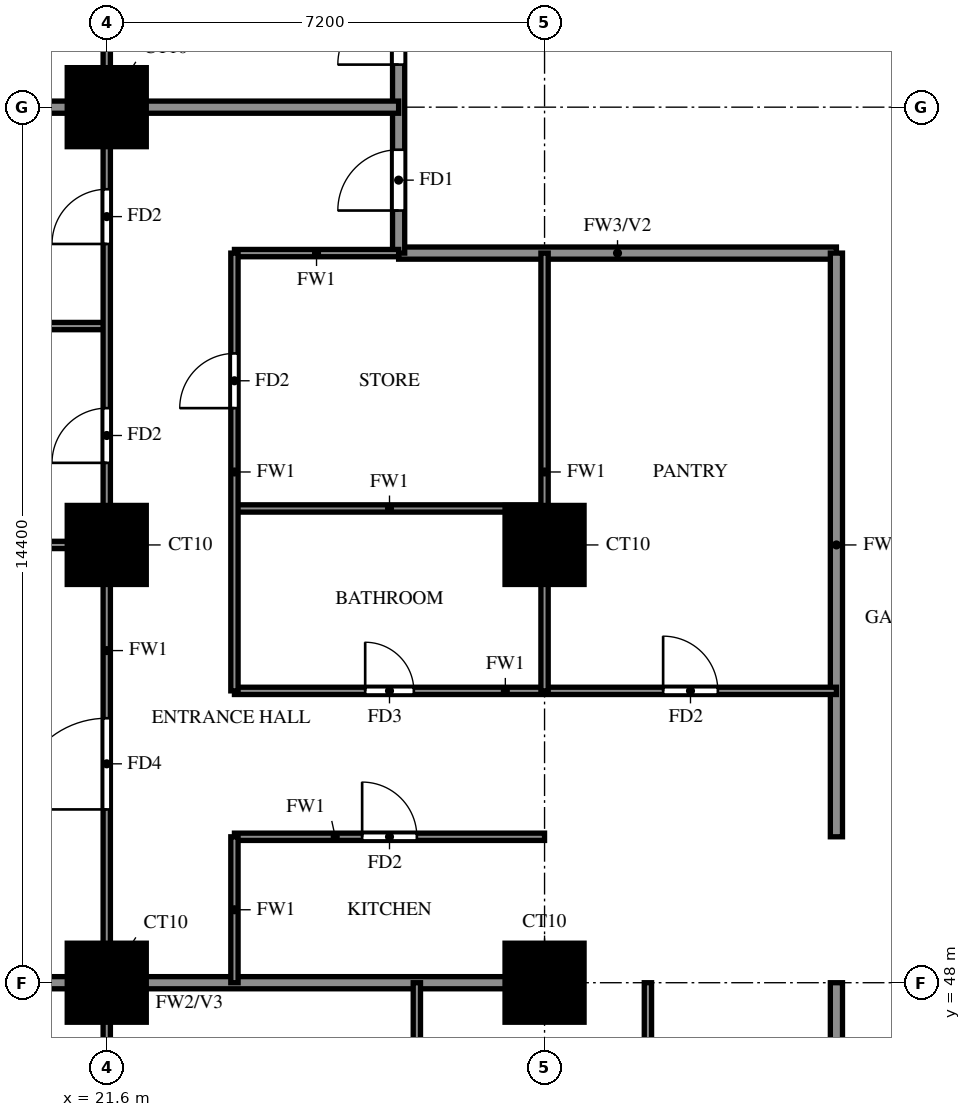
"""IFC4 building model, lengths in metres.
Left out: names, types, materials, properties, quantities, classifications, styles, units other than length and angle.
Written with IfcOpenShell. Run it as: python <this file> out.ifc"""

import sys

from ifc_helpers import new_model, si_unit, direction, frame, frame_2d, origin, origin_2d, place, context, subcontext, project, spatial, rectangle, extrude, source, transform, mapped, element, fill, save


model = new_model("IFC4")
c1 = context("Model", 3, precision=1e-05, world=origin(), true_north=direction((0.0, 1.0)))
c2 = subcontext(c1, "Body", "Model", "MODEL_VIEW")
j1 = project(units=[si_unit("LENGTHUNIT", "METRE"), si_unit("PLANEANGLEUNIT", "RADIAN")], contexts=[c1])
p1 = place(None, origin())
s1 = spatial("IfcSite", under=j1, at=p1, CompositionType="ELEMENT")
p2 = place(p1, origin())
s2 = spatial("IfcBuilding", under=s1, at=p2, CompositionType="ELEMENT")
p3 = place(p2, frame((0.0, 0.0, 79.5)))
s3 = spatial("IfcBuildingStorey", under=s2, at=p3, CompositionType="ELEMENT", Elevation=79.5)
m1 = source(origin(), c2, "Body", "SweptSolid", [
    extrude(rectangle(XDim=1.3, YDim=1.3, at=origin_2d()), origin(), (0.0, 0.0, 1.0), 3.18),
])
for number, where, z_axis, x_axis in (
    (1, (21.6, 48.0, 0.0), (0.0, 0.0, 1.0), (1.0, 0.0, 0.0)),
    (2, (28.8, 48.0, 0.0), (0.0, 0.0, 1.0), (1.0, 0.0, 0.0)),
    (3, (21.6, 55.2, 0.0), (0.0, 0.0, 1.0), (1.0, 0.0, 0.0)),
    (4, (28.8, 55.2, 0.0), (0.0, 0.0, 1.0), (1.0, 0.0, 0.0)),
    (5, (21.6, 62.4, 0.0), (0.0, 0.0, 1.0), (1.0, 0.0, 0.0)),
):
    element("IfcColumn", number, at=place(p3, frame(where, z_axis=z_axis, x_axis=x_axis)), inside=s3, PredefinedType="COLUMN", context=c2, shape_type="MappedRepresentation", body=[
        mapped(m1, transform((0.0, 0.0, 0.0))),
    ])
p4 = place(p3, frame((26.4, 60.0, 0.0), z_axis=(0.0, 0.0, 1.0), x_axis=(1.0, 0.0, 0.0)))
e6 = element("IfcWall", 6, at=p4, inside=s3, PredefinedType="SOLIDWALL", context=c2, shape_type="SweptSolid", body=[
    extrude(rectangle(XDim=7.2, YDim=0.2, at=frame_2d((3.6, 0.0))), origin(), (0.0, 0.0, 1.0), 3.18),
])
p5 = place(p3, frame((26.4, 60.0, 0.0), z_axis=(0.0, 0.0, 1.0), x_axis=(0.0, 1.0, 0.0)))
e7 = element("IfcWall", 7, at=p5, inside=s3, PredefinedType="SOLIDWALL", context=c2, shape_type="SweptSolid", body=[
    extrude(rectangle(XDim=9.45, YDim=0.2, at=frame_2d((4.725, 0.0))), origin(), (0.0, 0.0, 1.0), 3.18),
])
p6 = place(p5, frame((0.7, 0.0, 0.0)))
e8 = element("IfcOpeningElement", 8, at=p6, cuts=e7, PredefinedType="OPENING", context=c2, shape_type="SweptSolid", body=[
    extrude(rectangle(XDim=1.0, YDim=2.1, at=frame_2d((0.5, 1.05))), frame((0.0, 0.11, 0.0), z_axis=(0.0, -1.0, 0.0), x_axis=(1.0, 0.0, 0.0)), (0.0, 0.0, 1.0), 0.22),
])
p7 = place(p5, frame((3.1, 0.0, 0.0)))
e9 = element("IfcOpeningElement", 9, at=p7, cuts=e7, PredefinedType="OPENING", context=c2, shape_type="SweptSolid", body=[
    extrude(rectangle(XDim=1.0, YDim=2.1, at=frame_2d((0.5, 1.05))), frame((0.0, 0.11, 0.0), z_axis=(0.0, -1.0, 0.0), x_axis=(1.0, 0.0, 0.0)), (0.0, 0.0, 1.0), 0.22),
])
p8 = place(p3, frame((33.6, 45.6, 0.0), z_axis=(0.0, 0.0, 1.0), x_axis=(0.0, 1.0, 0.0)))
e10 = element("IfcWall", 10, at=p8, inside=s3, PredefinedType="SOLIDWALL", context=c2, shape_type="SweptSolid", body=[
    extrude(rectangle(XDim=2.4, YDim=0.2, at=frame_2d((1.2, 0.0))), origin(), (0.0, 0.0, 1.0), 3.18),
])
p9 = place(p3, frame((33.6, 50.4, 0.0), z_axis=(0.0, 0.0, 1.0), x_axis=(0.0, 1.0, 0.0)))
e11 = element("IfcWall", 11, at=p9, inside=s3, PredefinedType="SOLIDWALL", context=c2, shape_type="SweptSolid", body=[
    extrude(rectangle(XDim=9.6, YDim=0.2, at=frame_2d((4.8, 0.0))), origin(), (0.0, 0.0, 1.0), 3.18),
])
p10 = place(p3, frame((14.525, 48.0, 0.0), z_axis=(0.0, 0.0, 1.0), x_axis=(1.0, 0.0, 0.0)))
e12 = element("IfcWall", 12, at=p10, inside=s3, PredefinedType="SOLIDWALL", context=c2, shape_type="SweptSolid", body=[
    extrude(rectangle(XDim=14.275, YDim=0.2, at=frame_2d((7.138, 0.0))), origin(), (0.0, 0.0, 1.0), 3.18),
])
p11 = place(p3, frame((14.525, 62.4, 0.0), z_axis=(0.0, 0.0, 1.0), x_axis=(1.0, 0.0, 0.0)))
e13 = element("IfcWall", 13, at=p11, inside=s3, PredefinedType="SOLIDWALL", context=c2, shape_type="SweptSolid", body=[
    extrude(rectangle(XDim=11.875, YDim=0.2, at=frame_2d((5.938, 0.0))), origin(), (0.0, 0.0, 1.0), 3.18),
])
p12 = place(p3, frame((23.7, 50.4, 0.0), z_axis=(0.0, 0.0, 1.0), x_axis=(1.0, 0.0, 0.0)))
e14 = element("IfcWall", 14, at=p12, inside=s3, PredefinedType="PARTITIONING", context=c2, shape_type="SweptSolid", body=[
    extrude(rectangle(XDim=5.1, YDim=0.12, at=frame_2d((2.55, 0.0))), origin(), (0.0, 0.0, 1.0), 3.18),
])
p13 = place(p12, frame((2.1, 0.0, 0.0)))
e15 = element("IfcOpeningElement", 15, at=p13, cuts=e14, PredefinedType="OPENING", context=c2, shape_type="SweptSolid", body=[
    extrude(rectangle(XDim=0.9, YDim=2.1, at=frame_2d((0.45, 1.05))), frame((0.0, 0.07, 0.0), z_axis=(0.0, -1.0, 0.0), x_axis=(1.0, 0.0, 0.0)), (0.0, 0.0, 1.0), 0.14),
])
p14 = place(p3, frame((23.7, 52.8, 0.0), z_axis=(0.0, 0.0, 1.0), x_axis=(1.0, 0.0, 0.0)))
e16 = element("IfcWall", 16, at=p14, inside=s3, PredefinedType="PARTITIONING", context=c2, shape_type="SweptSolid", body=[
    extrude(rectangle(XDim=9.9, YDim=0.12, at=frame_2d((4.95, 0.0))), origin(), (0.0, 0.0, 1.0), 3.18),
])
p15 = place(p14, frame((2.15, 0.0, 0.0)))
e17 = element("IfcOpeningElement", 17, at=p15, cuts=e16, PredefinedType="OPENING", context=c2, shape_type="SweptSolid", body=[
    extrude(rectangle(XDim=0.8, YDim=2.1, at=frame_2d((0.4, 1.05))), frame((0.0, 0.07, 0.0), z_axis=(0.0, -1.0, 0.0), x_axis=(1.0, 0.0, 0.0)), (0.0, 0.0, 1.0), 0.14),
])
p16 = place(p14, frame((7.05, 0.0, 0.0)))
e18 = element("IfcOpeningElement", 18, at=p16, cuts=e16, PredefinedType="OPENING", context=c2, shape_type="SweptSolid", body=[
    extrude(rectangle(XDim=0.9, YDim=2.1, at=frame_2d((0.45, 1.05))), frame((0.0, 0.07, 0.0), z_axis=(0.0, -1.0, 0.0), x_axis=(1.0, 0.0, 0.0)), (0.0, 0.0, 1.0), 0.14),
])
p17 = place(p3, frame((14.525, 55.2, 0.0), z_axis=(0.0, 0.0, 1.0), x_axis=(1.0, 0.0, 0.0)))
e19 = element("IfcWall", 19, at=p17, inside=s3, PredefinedType="PARTITIONING", context=c2, shape_type="SweptSolid", body=[
    extrude(rectangle(XDim=7.075, YDim=0.12, at=frame_2d((3.538, 0.0))), origin(), (0.0, 0.0, 1.0), 3.18),
])
p18 = place(p3, frame((23.7, 55.8, 0.0), z_axis=(0.0, 0.0, 1.0), x_axis=(1.0, 0.0, 0.0)))
e20 = element("IfcWall", 20, at=p18, inside=s3, PredefinedType="PARTITIONING", context=c2, shape_type="SweptSolid", body=[
    extrude(rectangle(XDim=5.1, YDim=0.12, at=frame_2d((2.55, 0.0))), origin(), (0.0, 0.0, 1.0), 3.18),
])
p19 = place(p3, frame((14.525, 58.8, 0.0), z_axis=(0.0, 0.0, 1.0), x_axis=(1.0, 0.0, 0.0)))
e21 = element("IfcWall", 21, at=p19, inside=s3, PredefinedType="PARTITIONING", context=c2, shape_type="SweptSolid", body=[
    extrude(rectangle(XDim=7.075, YDim=0.12, at=frame_2d((3.538, 0.0))), origin(), (0.0, 0.0, 1.0), 2.28),
])
p20 = place(p3, frame((23.7, 60.0, 0.0), z_axis=(0.0, 0.0, 1.0), x_axis=(1.0, 0.0, 0.0)))
e22 = element("IfcWall", 22, at=p20, inside=s3, PredefinedType="PARTITIONING", context=c2, shape_type="SweptSolid", body=[
    extrude(rectangle(XDim=2.7, YDim=0.12, at=frame_2d((1.35, 0.0))), origin(), (0.0, 0.0, 1.0), 3.18),
])
p21 = place(p3, frame((21.6, 33.725, 0.0), z_axis=(0.0, 0.0, 1.0), x_axis=(0.0, 1.0, 0.0)))
e23 = element("IfcWall", 23, at=p21, inside=s3, PredefinedType="PARTITIONING", context=c2, shape_type="SweptSolid", body=[
    extrude(rectangle(XDim=39.475, YDim=0.12, at=frame_2d((19.737, 0.0))), origin(), (0.0, 0.0, 1.0), 3.18),
])
p22 = place(p21, frame((7.775, 0.0, 0.0)))
e24 = element("IfcOpeningElement", 24, at=p22, cuts=e23, PredefinedType="OPENING", context=c2, shape_type="SweptSolid", body=[
    extrude(rectangle(XDim=0.9, YDim=2.1, at=frame_2d((0.45, 1.05))), frame((0.0, 0.07, 0.0), z_axis=(0.0, -1.0, 0.0), x_axis=(1.0, 0.0, 0.0)), (0.0, 0.0, 1.0), 0.14),
])
p23 = place(p21, frame((17.125, 0.0, 0.0)))
e25 = element("IfcOpeningElement", 25, at=p23, cuts=e23, PredefinedType="OPENING", context=c2, shape_type="SweptSolid", body=[
    extrude(rectangle(XDim=1.5, YDim=2.1, at=frame_2d((0.75, 1.05))), frame((0.0, 0.07, 0.0), z_axis=(0.0, -1.0, 0.0), x_axis=(1.0, 0.0, 0.0)), (0.0, 0.0, 1.0), 0.14),
])
p24 = place(p21, frame((22.825, 0.0, 0.0)))
e26 = element("IfcOpeningElement", 26, at=p24, cuts=e23, PredefinedType="OPENING", context=c2, shape_type="SweptSolid", body=[
    extrude(rectangle(XDim=0.9, YDim=2.1, at=frame_2d((0.45, 1.05))), frame((0.0, 0.07, 0.0), z_axis=(0.0, -1.0, 0.0), x_axis=(1.0, 0.0, 0.0)), (0.0, 0.0, 1.0), 0.14),
])
p25 = place(p21, frame((26.425, 0.0, 0.0)))
e27 = element("IfcOpeningElement", 27, at=p25, cuts=e23, PredefinedType="OPENING", context=c2, shape_type="SweptSolid", body=[
    extrude(rectangle(XDim=0.9, YDim=2.1, at=frame_2d((0.45, 1.05))), frame((0.0, 0.07, 0.0), z_axis=(0.0, -1.0, 0.0), x_axis=(1.0, 0.0, 0.0)), (0.0, 0.0, 1.0), 0.14),
])
p26 = place(p21, frame((30.025, 0.0, 0.0)))
e28 = element("IfcOpeningElement", 28, at=p26, cuts=e23, PredefinedType="OPENING", context=c2, shape_type="SweptSolid", body=[
    extrude(rectangle(XDim=0.9, YDim=2.1, at=frame_2d((0.45, 1.05))), frame((0.0, 0.07, 0.0), z_axis=(0.0, -1.0, 0.0), x_axis=(1.0, 0.0, 0.0)), (0.0, 0.0, 1.0), 0.14),
])
p27 = place(p21, frame((33.625, 0.0, 0.0)))
e29 = element("IfcOpeningElement", 29, at=p27, cuts=e23, PredefinedType="OPENING", context=c2, shape_type="SweptSolid", body=[
    extrude(rectangle(XDim=0.9, YDim=2.1, at=frame_2d((0.45, 1.05))), frame((0.0, 0.07, 0.0), z_axis=(0.0, -1.0, 0.0), x_axis=(1.0, 0.0, 0.0)), (0.0, 0.0, 1.0), 0.14),
])
p28 = place(p21, frame((37.225, 0.0, 0.0)))
e30 = element("IfcOpeningElement", 30, at=p28, cuts=e23, PredefinedType="OPENING", context=c2, shape_type="SweptSolid", body=[
    extrude(rectangle(XDim=0.9, YDim=2.1, at=frame_2d((0.45, 1.05))), frame((0.0, 0.07, 0.0), z_axis=(0.0, -1.0, 0.0), x_axis=(1.0, 0.0, 0.0)), (0.0, 0.0, 1.0), 0.14),
])
p29 = place(p3, frame((23.7, 48.0, 0.0), z_axis=(0.0, 0.0, 1.0), x_axis=(0.0, 1.0, 0.0)))
e31 = element("IfcWall", 31, at=p29, inside=s3, PredefinedType="PARTITIONING", context=c2, shape_type="SweptSolid", body=[
    extrude(rectangle(XDim=2.4, YDim=0.12, at=frame_2d((1.2, 0.0))), origin(), (0.0, 0.0, 1.0), 3.18),
])
p30 = place(p3, frame((23.7, 52.8, 0.0), z_axis=(0.0, 0.0, 1.0), x_axis=(0.0, 1.0, 0.0)))
e32 = element("IfcWall", 32, at=p30, inside=s3, PredefinedType="PARTITIONING", context=c2, shape_type="SweptSolid", body=[
    extrude(rectangle(XDim=7.2, YDim=0.12, at=frame_2d((3.6, 0.0))), origin(), (0.0, 0.0, 1.0), 3.18),
])
p31 = place(p30, frame((4.65, 0.0, 0.0)))
e33 = element("IfcOpeningElement", 33, at=p31, cuts=e32, PredefinedType="OPENING", context=c2, shape_type="SweptSolid", body=[
    extrude(rectangle(XDim=0.9, YDim=2.1, at=frame_2d((0.45, 1.05))), frame((0.0, 0.07, 0.0), z_axis=(0.0, -1.0, 0.0), x_axis=(1.0, 0.0, 0.0)), (0.0, 0.0, 1.0), 0.14),
])
p32 = place(p3, frame((26.7, 42.9, 0.0), z_axis=(0.0, 0.0, 1.0), x_axis=(0.0, 1.0, 0.0)))
e34 = element("IfcWall", 34, at=p32, inside=s3, PredefinedType="PARTITIONING", context=c2, shape_type="SweptSolid", body=[
    extrude(rectangle(XDim=5.1, YDim=0.12, at=frame_2d((2.55, 0.0))), origin(), (0.0, 0.0, 1.0), 3.18),
])
p33 = place(p3, frame((28.8, 52.8, 0.0), z_axis=(0.0, 0.0, 1.0), x_axis=(0.0, 1.0, 0.0)))
e35 = element("IfcWall", 35, at=p33, inside=s3, PredefinedType="PARTITIONING", context=c2, shape_type="SweptSolid", body=[
    extrude(rectangle(XDim=7.2, YDim=0.12, at=frame_2d((3.6, 0.0))), origin(), (0.0, 0.0, 1.0), 3.18),
])
p34 = place(p3, frame((30.5, 42.9, 0.0), z_axis=(0.0, 0.0, 1.0), x_axis=(0.0, 1.0, 0.0)))
e36 = element("IfcWall", 36, at=p34, inside=s3, PredefinedType="PARTITIONING", context=c2, shape_type="SweptSolid", body=[
    extrude(rectangle(XDim=5.1, YDim=0.12, at=frame_2d((2.55, 0.0))), origin(), (0.0, 0.0, 1.0), 3.18),
])
p35 = place(p6, origin())
e37 = element("IfcDoor", 37, at=p35, inside=s3, OperationType="SINGLE_SWING_LEFT", PredefinedType="DOOR", context=c2, shape_type="SweptSolid", body=[
    extrude(rectangle(XDim=1.0, YDim=2.1, at=frame_2d((0.5, 1.05))), frame((0.0, 0.025, 0.0), z_axis=(0.0, -1.0, 0.0), x_axis=(1.0, 0.0, 0.0)), (0.0, 0.0, 1.0), 0.05),
])
fill(e8, e37)
p36 = place(p23, origin())
e38 = element("IfcDoor", 38, at=p36, inside=s3, OperationType="SINGLE_SWING_RIGHT", PredefinedType="DOOR", context=c2, shape_type="SweptSolid", body=[
    extrude(rectangle(XDim=1.5, YDim=2.1, at=frame_2d((0.75, 1.05))), frame((0.0, 0.025, 0.0), z_axis=(0.0, -1.0, 0.0), x_axis=(1.0, 0.0, 0.0)), (0.0, 0.0, 1.0), 0.05),
])
fill(e25, e38)
p37 = place(p24, origin())
e39 = element("IfcDoor", 39, at=p37, inside=s3, OperationType="SINGLE_SWING_LEFT", PredefinedType="DOOR", context=c2, shape_type="SweptSolid", body=[
    extrude(rectangle(XDim=0.9, YDim=2.1, at=frame_2d((0.45, 1.05))), frame((0.0, 0.025, 0.0), z_axis=(0.0, -1.0, 0.0), x_axis=(1.0, 0.0, 0.0)), (0.0, 0.0, 1.0), 0.05),
])
fill(e26, e39)
p38 = place(p25, origin())
e40 = element("IfcDoor", 40, at=p38, inside=s3, OperationType="SINGLE_SWING_LEFT", PredefinedType="DOOR", context=c2, shape_type="SweptSolid", body=[
    extrude(rectangle(XDim=0.9, YDim=2.1, at=frame_2d((0.45, 1.05))), frame((0.0, 0.025, 0.0), z_axis=(0.0, -1.0, 0.0), x_axis=(1.0, 0.0, 0.0)), (0.0, 0.0, 1.0), 0.05),
])
fill(e27, e40)
p39 = place(p13, origin())
e41 = element("IfcDoor", 41, at=p39, inside=s3, OperationType="SINGLE_SWING_RIGHT", PredefinedType="DOOR", context=c2, shape_type="SweptSolid", body=[
    extrude(rectangle(XDim=0.9, YDim=2.1, at=frame_2d((0.45, 1.05))), frame((0.0, 0.025, 0.0), z_axis=(0.0, -1.0, 0.0), x_axis=(1.0, 0.0, 0.0)), (0.0, 0.0, 1.0), 0.05),
])
fill(e15, e41)
p40 = place(p15, origin())
e42 = element("IfcDoor", 42, at=p40, inside=s3, OperationType="SINGLE_SWING_LEFT", PredefinedType="DOOR", context=c2, shape_type="SweptSolid", body=[
    extrude(rectangle(XDim=0.8, YDim=2.1, at=frame_2d((0.4, 1.05))), frame((0.0, 0.025, 0.0), z_axis=(0.0, -1.0, 0.0), x_axis=(1.0, 0.0, 0.0)), (0.0, 0.0, 1.0), 0.05),
])
fill(e17, e42)
p41 = place(p31, origin())
e43 = element("IfcDoor", 43, at=p41, inside=s3, OperationType="SINGLE_SWING_LEFT", PredefinedType="DOOR", context=c2, shape_type="SweptSolid", body=[
    extrude(rectangle(XDim=0.9, YDim=2.1, at=frame_2d((0.45, 1.05))), frame((0.0, 0.025, 0.0), z_axis=(0.0, -1.0, 0.0), x_axis=(1.0, 0.0, 0.0)), (0.0, 0.0, 1.0), 0.05),
])
fill(e33, e43)
p42 = place(p16, origin())
e44 = element("IfcDoor", 44, at=p42, inside=s3, OperationType="SINGLE_SWING_RIGHT", PredefinedType="DOOR", context=c2, shape_type="SweptSolid", body=[
    extrude(rectangle(XDim=0.9, YDim=2.1, at=frame_2d((0.45, 1.05))), frame((0.0, 0.025, 0.0), z_axis=(0.0, -1.0, 0.0), x_axis=(1.0, 0.0, 0.0)), (0.0, 0.0, 1.0), 0.05),
])
fill(e18, e44)
p43 = place(p7, origin())
e45 = element("IfcDoor", 45, at=p43, inside=s3, OperationType="SINGLE_SWING_RIGHT", PredefinedType="DOOR", context=c2, shape_type="SweptSolid", body=[
    extrude(rectangle(XDim=1.0, YDim=2.1, at=frame_2d((0.5, 1.05))), frame((0.0, 0.025, 0.0), z_axis=(0.0, -1.0, 0.0), x_axis=(1.0, 0.0, 0.0)), (0.0, 0.0, 1.0), 0.05),
])
fill(e9, e45)
save(model, sys.argv[1])
